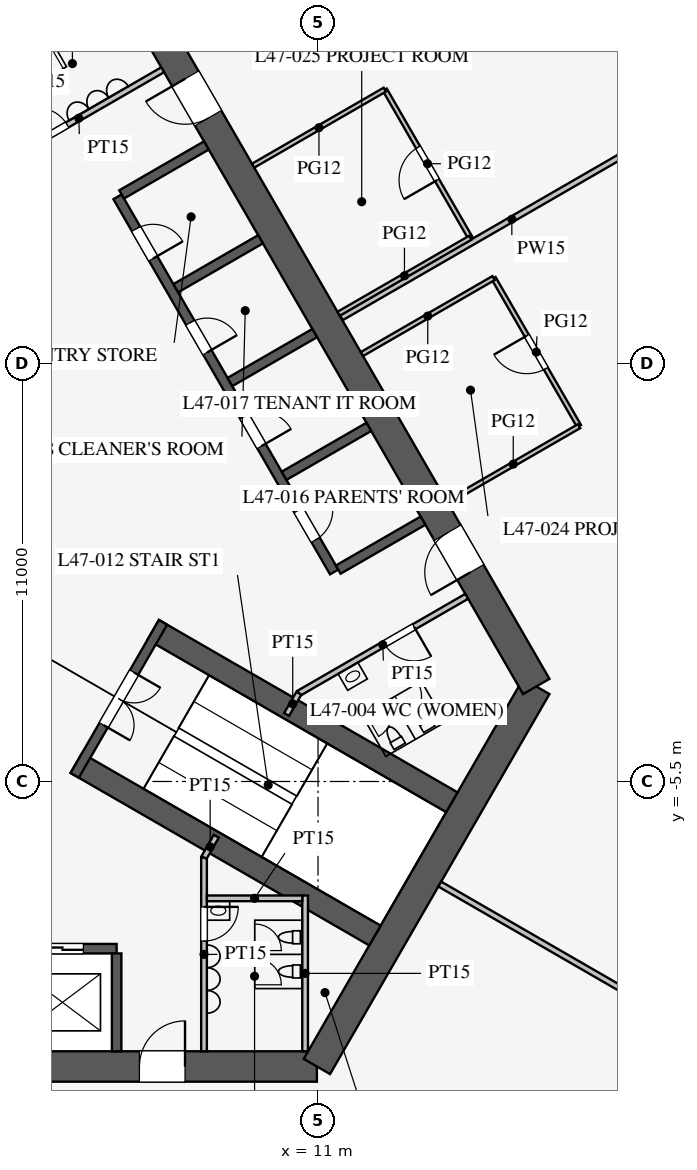
"""IFC4 building model, lengths in metres.
Left out: names, types, materials, properties, quantities, classifications, styles, units other than length and angle.
Written with IfcOpenShell. Run it as: python <this file> out.ifc"""

import sys

from ifc_helpers import new_model, si_unit, direction, frame, frame_2d, origin, place, context, subcontext, project, spatial, rectangle, extrude, element, fill, save


model = new_model("IFC4")
c1 = context("Model", 3, precision=1e-05, world=origin(), true_north=direction((0.0, 1.0)))
c2 = subcontext(c1, "Body", "Model", "MODEL_VIEW")
j1 = project(units=[si_unit("LENGTHUNIT", "METRE"), si_unit("PLANEANGLEUNIT", "RADIAN")], contexts=[c1])
p1 = place(None, origin())
s1 = spatial("IfcSite", under=j1, at=p1, CompositionType="ELEMENT")
p2 = place(p1, origin())
s2 = spatial("IfcBuilding", under=s1, at=p2, CompositionType="ELEMENT")
p3 = place(p2, frame((0.0, 0.0, 206.5)))
s3 = spatial("IfcBuildingStorey", under=s2, at=p3, CompositionType="ELEMENT", Elevation=206.5)
p4 = place(p3, frame((-10.97, -13.0, 0.0), z_axis=(0.0, 0.0, 1.0), x_axis=(1.0, 0.0, 0.0)))
e1 = element("IfcWall", 1, at=p4, inside=s3, PredefinedType="SHEAR", context=c2, shape_type="SweptSolid", body=[
    extrude(rectangle(XDim=21.939, YDim=0.8, at=frame_2d((10.97, 0.0))), origin(), (0.0, 0.0, 1.0), 4.2),
])
p5 = place(p4, frame((17.27, 0.0, 0.0)))
e2 = element("IfcOpeningElement", 2, at=p5, cuts=e1, PredefinedType="OPENING", context=c2, shape_type="SweptSolid", body=[
    extrude(rectangle(XDim=1.2, YDim=2.1, at=frame_2d((0.6, 1.05))), frame((0.0, 0.41, 0.0), z_axis=(0.0, -1.0, 0.0), x_axis=(1.0, 0.0, 0.0)), (0.0, 0.0, 1.0), 0.82),
])
p6 = place(p4, frame((3.47, 0.0, 0.0)))
e3 = element("IfcOpeningElement", 3, at=p6, cuts=e1, PredefinedType="OPENING", context=c2, shape_type="SweptSolid", body=[
    extrude(rectangle(XDim=1.2, YDim=2.1, at=frame_2d((0.6, 1.05))), frame((0.0, 0.41, 0.0), z_axis=(0.0, -1.0, 0.0), x_axis=(1.0, 0.0, 0.0)), (0.0, 0.0, 1.0), 0.82),
])
p7 = place(p3, frame((10.97, -13.0, 0.0), z_axis=(0.0, 0.0, 1.0), x_axis=(0.499995765644, 0.866027848477, 0.0)))
e4 = element("IfcWall", 4, at=p7, inside=s3, PredefinedType="SHEAR", context=c2, shape_type="SweptSolid", body=[
    extrude(rectangle(XDim=11.547, YDim=0.8, at=frame_2d((5.773, 0.0))), origin(), (0.0, 0.0, 1.0), 4.2),
])
p8 = place(p3, frame((16.743, -3.0, 0.0), z_axis=(0.0, 0.0, 1.0), x_axis=(-0.500002442456, 0.866023993627, 0.0)))
e5 = element("IfcWall", 5, at=p8, inside=s3, PredefinedType="SHEAR", context=c2, shape_type="SweptSolid", body=[
    extrude(rectangle(XDim=21.939, YDim=0.8, at=frame_2d((10.97, 0.0))), origin(), (0.0, 0.0, 1.0), 4.2),
])
p9 = place(p8, frame((17.27, 0.0, 0.0)))
e6 = element("IfcOpeningElement", 6, at=p9, cuts=e5, PredefinedType="OPENING", context=c2, shape_type="SweptSolid", body=[
    extrude(rectangle(XDim=1.2, YDim=2.1, at=frame_2d((0.6, 1.05))), frame((0.0, 0.41, 0.0), z_axis=(0.0, -1.0, 0.0), x_axis=(1.0, 0.0, 0.0)), (0.0, 0.0, 1.0), 0.82),
])
p10 = place(p8, frame((3.47, 0.0, 0.0)))
e7 = element("IfcOpeningElement", 7, at=p10, cuts=e5, PredefinedType="OPENING", context=c2, shape_type="SweptSolid", body=[
    extrude(rectangle(XDim=1.2, YDim=2.1, at=frame_2d((0.6, 1.05))), frame((0.0, 0.41, 0.0), z_axis=(0.0, -1.0, 0.0), x_axis=(1.0, 0.0, 0.0)), (0.0, 0.0, 1.0), 0.82),
])
p11 = place(p3, frame((-5.7, -9.9, 0.0), z_axis=(0.0, 0.0, 1.0), x_axis=(1.0, 0.0, 0.0)))
e8 = element("IfcWall", 8, at=p11, inside=s3, PredefinedType="SHEAR", context=c2, shape_type="SweptSolid", body=[
    extrude(rectangle(XDim=11.4, YDim=0.25, at=frame_2d((5.7, 0.0))), origin(), (0.0, 0.0, 1.0), 4.2),
])
p12 = place(p11, frame((0.875, 0.0, 0.0)))
e9 = element("IfcOpeningElement", 9, at=p12, cuts=e8, PredefinedType="OPENING", context=c2, shape_type="SweptSolid", body=[
    extrude(rectangle(XDim=1.1, YDim=2.2, at=frame_2d((0.55, 1.1))), frame((0.0, 0.135, 0.0), z_axis=(0.0, -1.0, 0.0), x_axis=(1.0, 0.0, 0.0)), (0.0, 0.0, 1.0), 0.27),
])
p13 = place(p11, frame((3.725, 0.0, 0.0)))
e10 = element("IfcOpeningElement", 10, at=p13, cuts=e8, PredefinedType="OPENING", context=c2, shape_type="SweptSolid", body=[
    extrude(rectangle(XDim=1.1, YDim=2.2, at=frame_2d((0.55, 1.1))), frame((0.0, 0.135, 0.0), z_axis=(0.0, -1.0, 0.0), x_axis=(1.0, 0.0, 0.0)), (0.0, 0.0, 1.0), 0.27),
])
p14 = place(p11, frame((6.575, 0.0, 0.0)))
e11 = element("IfcOpeningElement", 11, at=p14, cuts=e8, PredefinedType="OPENING", context=c2, shape_type="SweptSolid", body=[
    extrude(rectangle(XDim=1.1, YDim=2.2, at=frame_2d((0.55, 1.1))), frame((0.0, 0.135, 0.0), z_axis=(0.0, -1.0, 0.0), x_axis=(1.0, 0.0, 0.0)), (0.0, 0.0, 1.0), 0.27),
])
p15 = place(p11, frame((9.425, 0.0, 0.0)))
e12 = element("IfcOpeningElement", 12, at=p15, cuts=e8, PredefinedType="OPENING", context=c2, shape_type="SweptSolid", body=[
    extrude(rectangle(XDim=1.1, YDim=2.2, at=frame_2d((0.55, 1.1))), frame((0.0, 0.135, 0.0), z_axis=(0.0, -1.0, 0.0), x_axis=(1.0, 0.0, 0.0)), (0.0, 0.0, 1.0), 0.27),
])
p16 = place(p3, frame((5.7, -10.025, 0.0), z_axis=(0.0, 0.0, 1.0), x_axis=(0.0, -1.0, 0.0)))
e13 = element("IfcWall", 13, at=p16, inside=s3, PredefinedType="SHEAR", context=c2, shape_type="SweptSolid", body=[
    extrude(rectangle(XDim=2.575, YDim=0.25, at=frame_2d((1.288, 0.0))), origin(), (0.0, 0.0, 1.0), 4.2),
])
p17 = place(p3, frame((11.424, 0.014, 0.0), z_axis=(0.0, 0.0, 1.0), x_axis=(-0.500001763848, 0.866024385424, 0.0)))
e14 = element("IfcWall", 14, at=p17, inside=s3, PredefinedType="SHEAR", context=c2, shape_type="SweptSolid", body=[
    extrude(rectangle(XDim=11.4, YDim=0.25, at=frame_2d((5.7, 0.0))), origin(), (0.0, 0.0, 1.0), 4.2),
])
p18 = place(p17, frame((0.975, 0.0, 0.0)))
e15 = element("IfcOpeningElement", 15, at=p18, cuts=e14, PredefinedType="OPENING", context=c2, shape_type="SweptSolid", body=[
    extrude(rectangle(XDim=0.9, YDim=2.1, at=frame_2d((0.45, 1.05))), frame((0.0, 0.135, 0.0), z_axis=(0.0, -1.0, 0.0), x_axis=(1.0, 0.0, 0.0)), (0.0, 0.0, 1.0), 0.27),
])
p19 = place(p17, frame((3.825, 0.0, 0.0)))
e16 = element("IfcOpeningElement", 16, at=p19, cuts=e14, PredefinedType="OPENING", context=c2, shape_type="SweptSolid", body=[
    extrude(rectangle(XDim=0.9, YDim=2.1, at=frame_2d((0.45, 1.05))), frame((0.0, 0.135, 0.0), z_axis=(0.0, -1.0, 0.0), x_axis=(1.0, 0.0, 0.0)), (0.0, 0.0, 1.0), 0.27),
])
p20 = place(p17, frame((6.675, 0.0, 0.0)))
e17 = element("IfcOpeningElement", 17, at=p20, cuts=e14, PredefinedType="OPENING", context=c2, shape_type="SweptSolid", body=[
    extrude(rectangle(XDim=0.9, YDim=2.1, at=frame_2d((0.45, 1.05))), frame((0.0, 0.135, 0.0), z_axis=(0.0, -1.0, 0.0), x_axis=(1.0, 0.0, 0.0)), (0.0, 0.0, 1.0), 0.27),
])
p21 = place(p17, frame((9.525, 0.0, 0.0)))
e18 = element("IfcOpeningElement", 18, at=p21, cuts=e14, PredefinedType="OPENING", context=c2, shape_type="SweptSolid", body=[
    extrude(rectangle(XDim=0.9, YDim=2.1, at=frame_2d((0.45, 1.05))), frame((0.0, 0.135, 0.0), z_axis=(0.0, -1.0, 0.0), x_axis=(1.0, 0.0, 0.0)), (0.0, 0.0, 1.0), 0.27),
])
for number, where, z_axis, x_axis in (
    (19, (11.532, 0.076, 0.0), (0.0, 0.0, 1.0), (0.866, 0.5, 0.0)),
    (20, (10.107, 2.544, 0.0), (0.0, 0.0, 1.0), (0.866, 0.5, 0.0)),
    (21, (8.682, 5.012, 0.0), (0.0, 0.0, 1.0), (0.866, 0.5, 0.0)),
    (22, (7.257, 7.481, 0.0), (0.0, 0.0, 1.0), (0.866, 0.5, 0.0)),
):
    element("IfcWall", number, at=place(p3, frame(where, z_axis=z_axis, x_axis=x_axis)), inside=s3, PredefinedType="SHEAR", context=c2, shape_type="SweptSolid", body=[
        extrude(rectangle(XDim=2.575, YDim=0.25, at=frame_2d((1.288, 0.0))), origin(), (0.0, 0.0, 1.0), 4.2),
    ])
p22 = place(p3, frame((5.832, 9.949, 0.0), z_axis=(0.0, 0.0, 1.0), x_axis=(0.866029291668, 0.499993265928, 0.0)))
e23 = element("IfcWall", 23, at=p22, inside=s3, PredefinedType="SHEAR", context=c2, shape_type="SweptSolid", body=[
    extrude(rectangle(XDim=2.575, YDim=0.25, at=frame_2d((1.288, 0.0))), origin(), (0.0, 0.0, 1.0), 4.2),
])
for number, where, z_axis, x_axis in (
    (24, (4.638, -5.016, 0.0), (0.0, 0.0, 1.0), (0.866, -0.5, 0.0)),
    (25, (6.663, -1.509, 0.0), (0.0, 0.0, 1.0), (0.866, -0.5, 0.0)),
):
    element("IfcWall", number, at=place(p3, frame(where, z_axis=z_axis, x_axis=x_axis)), inside=s3, PredefinedType="SHEAR", context=c2, shape_type="SweptSolid", body=[
        extrude(rectangle(XDim=9.075, YDim=0.6, at=frame_2d((4.538, 0.0))), origin(), (0.0, 0.0, 1.0), 4.2),
    ])
p23 = place(p3, frame((4.597, -5.339, 0.0), z_axis=(0.0, 0.0, 1.0), x_axis=(0.499984536904, 0.866034331223, 0.0)))
e26 = element("IfcWall", 26, at=p23, inside=s3, PredefinedType="SHEAR", context=c2, shape_type="SweptSolid", body=[
    extrude(rectangle(XDim=4.65, YDim=0.25, at=frame_2d((2.325, 0.0))), origin(), (0.0, 0.0, 1.0), 4.2),
])
p24 = place(p23, frame((1.525, 0.0, 0.0)))
e27 = element("IfcOpeningElement", 27, at=p24, cuts=e26, PredefinedType="OPENING", context=c2, shape_type="SweptSolid", body=[
    extrude(rectangle(XDim=1.6, YDim=2.1, at=frame_2d((0.8, 1.05))), frame((0.0, 0.135, 0.0), z_axis=(0.0, -1.0, 0.0), x_axis=(1.0, 0.0, 0.0)), (0.0, 0.0, 1.0), 0.27),
])
p25 = place(p3, frame((8.0, -7.5, 0.0), z_axis=(0.0, 0.0, 1.0), x_axis=(0.0, -1.0, 0.0)))
e28 = element("IfcWall", 28, at=p25, inside=s3, PredefinedType="PARTITIONING", context=c2, shape_type="SweptSolid", body=[
    extrude(rectangle(XDim=5.1, YDim=0.15, at=frame_2d((2.55, 0.0))), origin(), (0.0, 0.0, 1.0), 4.0),
])
p26 = place(p25, frame((1.3, 0.0, 0.0)))
e29 = element("IfcOpeningElement", 29, at=p26, cuts=e28, PredefinedType="OPENING", context=c2, shape_type="SweptSolid", body=[
    extrude(rectangle(XDim=0.9, YDim=2.1, at=frame_2d((0.45, 1.05))), frame((0.0, 0.085, 0.0), z_axis=(0.0, -1.0, 0.0), x_axis=(1.0, 0.0, 0.0)), (0.0, 0.0, 1.0), 0.17),
])
p27 = place(p3, frame((2.495, 10.678, 0.0), z_axis=(0.0, 0.0, 1.0), x_axis=(0.86602216432, 0.500005610874, 0.0)))
e30 = element("IfcWall", 30, at=p27, inside=s3, PredefinedType="PARTITIONING", context=c2, shape_type="SweptSolid", body=[
    extrude(rectangle(XDim=5.1, YDim=0.15, at=frame_2d((2.55, 0.0))), origin(), (0.0, 0.0, 1.0), 4.0),
])
p28 = place(p27, frame((1.3, 0.0, 0.0)))
e31 = element("IfcOpeningElement", 31, at=p28, cuts=e30, PredefinedType="OPENING", context=c2, shape_type="SweptSolid", body=[
    extrude(rectangle(XDim=0.9, YDim=2.1, at=frame_2d((0.45, 1.05))), frame((0.0, 0.085, 0.0), z_axis=(0.0, -1.0, 0.0), x_axis=(1.0, 0.0, 0.0)), (0.0, 0.0, 1.0), 0.17),
])
p29 = place(p3, frame((10.495, -3.178, 0.0), z_axis=(0.0, 0.0, 1.0), x_axis=(0.86602216432, 0.500005610874, 0.0)))
e32 = element("IfcWall", 32, at=p29, inside=s3, PredefinedType="PARTITIONING", context=c2, shape_type="SweptSolid", body=[
    extrude(rectangle(XDim=5.1, YDim=0.15, at=frame_2d((2.55, 0.0))), origin(), (0.0, 0.0, 1.0), 4.0),
])
p30 = place(p29, frame((2.6, 0.0, 0.0)))
e33 = element("IfcOpeningElement", 33, at=p30, cuts=e32, PredefinedType="OPENING", context=c2, shape_type="SweptSolid", body=[
    extrude(rectangle(XDim=0.9, YDim=2.1, at=frame_2d((0.45, 1.05))), frame((0.0, 0.085, 0.0), z_axis=(0.0, -1.0, 0.0), x_axis=(1.0, 0.0, 0.0)), (0.0, 0.0, 1.0), 0.17),
])
for number, where, z_axis, x_axis in (
    (34, (8.0, -7.5, 0.0), (0.0, 0.0, 1.0), (0.5, 0.866, 0.0)),
    (35, (10.495, -3.178, 0.0), (0.0, 0.0, 1.0), (-0.5, -0.866, 0.0)),
):
    element("IfcWall", number, at=place(p3, frame(where, z_axis=z_axis, x_axis=x_axis)), inside=s3, PredefinedType="PARTITIONING", context=c2, shape_type="SweptSolid", body=[
        extrude(rectangle(XDim=0.645, YDim=0.15, at=frame_2d((0.323, 0.0))), origin(), (0.0, 0.0, 1.0), 4.0),
    ])
p31 = place(p3, frame((10.66, -8.5, 0.0), z_axis=(0.0, 0.0, 1.0), x_axis=(0.0, -1.0, 0.0)))
e36 = element("IfcWall", 36, at=p31, inside=s3, PredefinedType="PARTITIONING", context=c2, shape_type="SweptSolid", body=[
    extrude(rectangle(XDim=4.1, YDim=0.15, at=frame_2d((2.05, 0.0))), origin(), (0.0, 0.0, 1.0), 4.0),
])
p32 = place(p3, frame((8.075, -8.575, 0.0), z_axis=(0.0, 0.0, 1.0), x_axis=(1.0, 0.0, 0.0)))
e37 = element("IfcWall", 37, at=p32, inside=s3, PredefinedType="PARTITIONING", context=c2, shape_type="SweptSolid", body=[
    extrude(rectangle(XDim=2.51, YDim=0.15, at=frame_2d((1.255, 0.0))), origin(), (0.0, 0.0, 1.0), 4.0),
])
p33 = place(p3, frame((2.031, 13.482, 0.0), z_axis=(0.0, 0.0, 1.0), x_axis=(0.866050731258, 0.499956128963, 0.0)))
e38 = element("IfcWall", 38, at=p33, inside=s3, PredefinedType="PARTITIONING", context=c2, shape_type="SweptSolid", body=[
    extrude(rectangle(XDim=4.1, YDim=0.15, at=frame_2d((2.05, 0.0))), origin(), (0.0, 0.0, 1.0), 4.0),
])
p34 = place(p3, frame((14.203, -8.2, 0.0), z_axis=(0.0, 0.0, 1.0), x_axis=(0.866021600284, -0.500006587798, 0.0)))
e39 = element("IfcWall", 39, at=p34, inside=s3, PredefinedType="PARTITIONING", context=c2, shape_type="SweptSolid", body=[
    extrude(rectangle(XDim=14.95, YDim=0.15, at=frame_2d((7.475, 0.0))), origin(), (0.0, 0.0, 1.0), 2.4),
])
p35 = place(p3, frame((11.613, 6.705, 0.0), z_axis=(0.0, 0.0, 1.0), x_axis=(0.86603333284, 0.499986266222, 0.0)))
e40 = element("IfcWall", 40, at=p35, inside=s3, PredefinedType="PARTITIONING", context=c2, shape_type="SweptSolid", body=[
    extrude(rectangle(XDim=10.361, YDim=0.15, at=frame_2d((5.18, 0.0))), origin(), (0.0, 0.0, 1.0), 3.3),
])
p36 = place(p3, frame((15.006, 8.808, 0.0), z_axis=(0.0, 0.0, 1.0), x_axis=(-0.500013631625, 0.866017533419, 0.0)))
e41 = element("IfcWall", 41, at=p36, inside=s3, PredefinedType="PARTITIONING", context=c2, shape_type="SweptSolid", body=[
    extrude(rectangle(XDim=4.5, YDim=0.12, at=frame_2d((2.25, 0.0))), origin(), (0.0, 0.0, 1.0), 2.9),
])
p37 = place(p36, frame((1.75, 0.0, 0.15)))
e42 = element("IfcOpeningElement", 42, at=p37, cuts=e41, PredefinedType="OPENING", context=c2, shape_type="SweptSolid", body=[
    extrude(rectangle(XDim=1.0, YDim=2.1, at=frame_2d((0.5, 1.05))), frame((0.0, 0.07, 0.0), z_axis=(0.0, -1.0, 0.0), x_axis=(1.0, 0.0, 0.0)), (0.0, 0.0, 1.0), 0.14),
])
p38 = place(p3, frame((17.869, 3.85, 0.0), z_axis=(0.0, 0.0, 1.0), x_axis=(-0.500013631625, 0.866017533419, 0.0)))
e43 = element("IfcWall", 43, at=p38, inside=s3, PredefinedType="PARTITIONING", context=c2, shape_type="SweptSolid", body=[
    extrude(rectangle(XDim=4.5, YDim=0.12, at=frame_2d((2.25, 0.0))), origin(), (0.0, 0.0, 1.0), 2.9),
])
p39 = place(p38, frame((1.75, 0.0, 0.15)))
e44 = element("IfcOpeningElement", 44, at=p39, cuts=e43, PredefinedType="OPENING", context=c2, shape_type="SweptSolid", body=[
    extrude(rectangle(XDim=1.0, YDim=2.1, at=frame_2d((0.5, 1.05))), frame((0.0, 0.07, 0.0), z_axis=(0.0, -1.0, 0.0), x_axis=(1.0, 0.0, 0.0)), (0.0, 0.0, 1.0), 0.14),
])
for number, where, z_axis, x_axis in (
    (45, (11.542, 6.808, 0.0), (0.0, 0.0, 1.0), (0.866, 0.5, 0.0)),
    (46, (9.292, 10.705, 0.0), (0.0, 0.0, 1.0), (0.866, 0.5, 0.0)),
    (47, (12.155, 5.747, 0.0), (0.0, 0.0, 1.0), (0.866, 0.5, 0.0)),
    (48, (14.405, 1.85, 0.0), (0.0, 0.0, 1.0), (0.866, 0.5, 0.0)),
):
    element("IfcWall", number, at=place(p3, frame(where, z_axis=z_axis, x_axis=x_axis)), inside=s3, PredefinedType="PARTITIONING", context=c2, shape_type="SweptSolid", body=[
        extrude(rectangle(XDim=4.0, YDim=0.12, at=frame_2d((2.0, 0.0))), origin(), (0.0, 0.0, 1.0), 2.9),
    ])
p40 = place(p26, origin())
e49 = element("IfcDoor", 49, at=p40, inside=s3, OperationType="SINGLE_SWING_LEFT", PredefinedType="DOOR", context=c2, shape_type="SweptSolid", body=[
    extrude(rectangle(XDim=0.9, YDim=2.1, at=frame_2d((0.45, 1.05))), frame((0.0, 0.025, 0.0), z_axis=(0.0, -1.0, 0.0), x_axis=(1.0, 0.0, 0.0)), (0.0, 0.0, 1.0), 0.05),
])
fill(e29, e49)
p41 = place(p28, origin())
e50 = element("IfcDoor", 50, at=p41, inside=s3, OperationType="SINGLE_SWING_LEFT", PredefinedType="DOOR", context=c2, shape_type="SweptSolid", body=[
    extrude(rectangle(XDim=0.9, YDim=2.1, at=frame_2d((0.45, 1.05))), frame((0.0, 0.025, 0.0), z_axis=(0.0, -1.0, 0.0), x_axis=(1.0, 0.0, 0.0)), (0.0, 0.0, 1.0), 0.05),
])
fill(e31, e50)
p42 = place(p30, frame((0.9, 0.0, 0.0), z_axis=(0.0, 0.0, 1.0), x_axis=(-1.0, 0.0, 0.0)))
e51 = element("IfcDoor", 51, at=p42, inside=s3, OperationType="SINGLE_SWING_LEFT", PredefinedType="DOOR", context=c2, shape_type="SweptSolid", body=[
    extrude(rectangle(XDim=0.9, YDim=2.1, at=frame_2d((0.45, 1.05))), frame((0.0, 0.025, 0.0), z_axis=(0.0, -1.0, 0.0), x_axis=(1.0, 0.0, 0.0)), (0.0, 0.0, 1.0), 0.05),
])
fill(e33, e51)
p43 = place(p24, frame((1.6, 0.0, 0.0), z_axis=(0.0, 0.0, 1.0), x_axis=(-1.0, 0.0, 0.0)))
e52 = element("IfcDoor", 52, at=p43, inside=s3, OperationType="DOUBLE_DOOR_SINGLE_SWING", PredefinedType="DOOR", context=c2, shape_type="SweptSolid", body=[
    extrude(rectangle(XDim=1.6, YDim=2.1, at=frame_2d((0.8, 1.05))), frame((0.0, 0.025, 0.0), z_axis=(0.0, -1.0, 0.0), x_axis=(1.0, 0.0, 0.0)), (0.0, 0.0, 1.0), 0.05),
])
fill(e27, e52)
p44 = place(p5, origin())
e53 = element("IfcDoor", 53, at=p44, inside=s3, OperationType="SINGLE_SWING_RIGHT", PredefinedType="DOOR", context=c2, shape_type="SweptSolid", body=[
    extrude(rectangle(XDim=1.2, YDim=2.1, at=frame_2d((0.6, 1.05))), frame((0.0, 0.025, 0.0), z_axis=(0.0, -1.0, 0.0), x_axis=(1.0, 0.0, 0.0)), (0.0, 0.0, 1.0), 0.05),
])
fill(e2, e53)
p45 = place(p9, origin())
e54 = element("IfcDoor", 54, at=p45, inside=s3, OperationType="SINGLE_SWING_RIGHT", PredefinedType="DOOR", context=c2, shape_type="SweptSolid", body=[
    extrude(rectangle(XDim=1.2, YDim=2.1, at=frame_2d((0.6, 1.05))), frame((0.0, 0.025, 0.0), z_axis=(0.0, -1.0, 0.0), x_axis=(1.0, 0.0, 0.0)), (0.0, 0.0, 1.0), 0.05),
])
fill(e6, e54)
p46 = place(p10, origin())
e55 = element("IfcDoor", 55, at=p46, inside=s3, OperationType="SINGLE_SWING_LEFT", PredefinedType="DOOR", context=c2, shape_type="SweptSolid", body=[
    extrude(rectangle(XDim=1.2, YDim=2.1, at=frame_2d((0.6, 1.05))), frame((0.0, 0.025, 0.0), z_axis=(0.0, -1.0, 0.0), x_axis=(1.0, 0.0, 0.0)), (0.0, 0.0, 1.0), 0.05),
])
fill(e7, e55)
p47 = place(p18, frame((0.9, 0.0, 0.0), z_axis=(0.0, 0.0, 1.0), x_axis=(-1.0, 0.0, 0.0)))
e56 = element("IfcDoor", 56, at=p47, inside=s3, OperationType="SINGLE_SWING_LEFT", PredefinedType="DOOR", context=c2, shape_type="SweptSolid", body=[
    extrude(rectangle(XDim=0.9, YDim=2.1, at=frame_2d((0.45, 1.05))), frame((0.0, 0.025, 0.0), z_axis=(0.0, -1.0, 0.0), x_axis=(1.0, 0.0, 0.0)), (0.0, 0.0, 1.0), 0.05),
])
fill(e15, e56)
p48 = place(p19, frame((0.9, 0.0, 0.0), z_axis=(0.0, 0.0, 1.0), x_axis=(-1.0, 0.0, 0.0)))
e57 = element("IfcDoor", 57, at=p48, inside=s3, OperationType="SINGLE_SWING_RIGHT", PredefinedType="DOOR", context=c2, shape_type="SweptSolid", body=[
    extrude(rectangle(XDim=0.9, YDim=2.1, at=frame_2d((0.45, 1.05))), frame((0.0, 0.025, 0.0), z_axis=(0.0, -1.0, 0.0), x_axis=(1.0, 0.0, 0.0)), (0.0, 0.0, 1.0), 0.05),
])
fill(e16, e57)
p49 = place(p20, frame((0.9, 0.0, 0.0), z_axis=(0.0, 0.0, 1.0), x_axis=(-1.0, 0.0, 0.0)))
e58 = element("IfcDoor", 58, at=p49, inside=s3, OperationType="SINGLE_SWING_RIGHT", PredefinedType="DOOR", context=c2, shape_type="SweptSolid", body=[
    extrude(rectangle(XDim=0.9, YDim=2.1, at=frame_2d((0.45, 1.05))), frame((0.0, 0.025, 0.0), z_axis=(0.0, -1.0, 0.0), x_axis=(1.0, 0.0, 0.0)), (0.0, 0.0, 1.0), 0.05),
])
fill(e17, e58)
p50 = place(p21, frame((0.9, 0.0, 0.0), z_axis=(0.0, 0.0, 1.0), x_axis=(-1.0, 0.0, 0.0)))
e59 = element("IfcDoor", 59, at=p50, inside=s3, OperationType="SINGLE_SWING_RIGHT", PredefinedType="DOOR", context=c2, shape_type="SweptSolid", body=[
    extrude(rectangle(XDim=0.9, YDim=2.1, at=frame_2d((0.45, 1.05))), frame((0.0, 0.025, 0.0), z_axis=(0.0, -1.0, 0.0), x_axis=(1.0, 0.0, 0.0)), (0.0, 0.0, 1.0), 0.05),
])
fill(e18, e59)
p51 = place(p39, origin())
e60 = element("IfcDoor", 60, at=p51, inside=s3, OperationType="SINGLE_SWING_RIGHT", PredefinedType="DOOR", context=c2, shape_type="SweptSolid", body=[
    extrude(rectangle(XDim=1.0, YDim=2.1, at=frame_2d((0.5, 1.05))), frame((0.0, 0.025, 0.0), z_axis=(0.0, -1.0, 0.0), x_axis=(1.0, 0.0, 0.0)), (0.0, 0.0, 1.0), 0.05),
])
fill(e44, e60)
p52 = place(p37, origin())
e61 = element("IfcDoor", 61, at=p52, inside=s3, OperationType="SINGLE_SWING_LEFT", PredefinedType="DOOR", context=c2, shape_type="SweptSolid", body=[
    extrude(rectangle(XDim=1.0, YDim=2.1, at=frame_2d((0.5, 1.05))), frame((0.0, 0.025, 0.0), z_axis=(0.0, -1.0, 0.0), x_axis=(1.0, 0.0, 0.0)), (0.0, 0.0, 1.0), 0.05),
])
fill(e42, e61)
p53 = place(p15, origin())
e62 = element("IfcDoor", 62, at=p53, inside=s3, OperationType="DOUBLE_DOOR_SLIDING", PredefinedType="DOOR", context=c2, shape_type="SweptSolid", body=[
    extrude(rectangle(XDim=1.1, YDim=2.2, at=frame_2d((0.55, 1.1))), frame((0.0, 0.025, 0.0), z_axis=(0.0, -1.0, 0.0), x_axis=(1.0, 0.0, 0.0)), (0.0, 0.0, 1.0), 0.05),
])
fill(e12, e62)
save(model, sys.argv[1])
